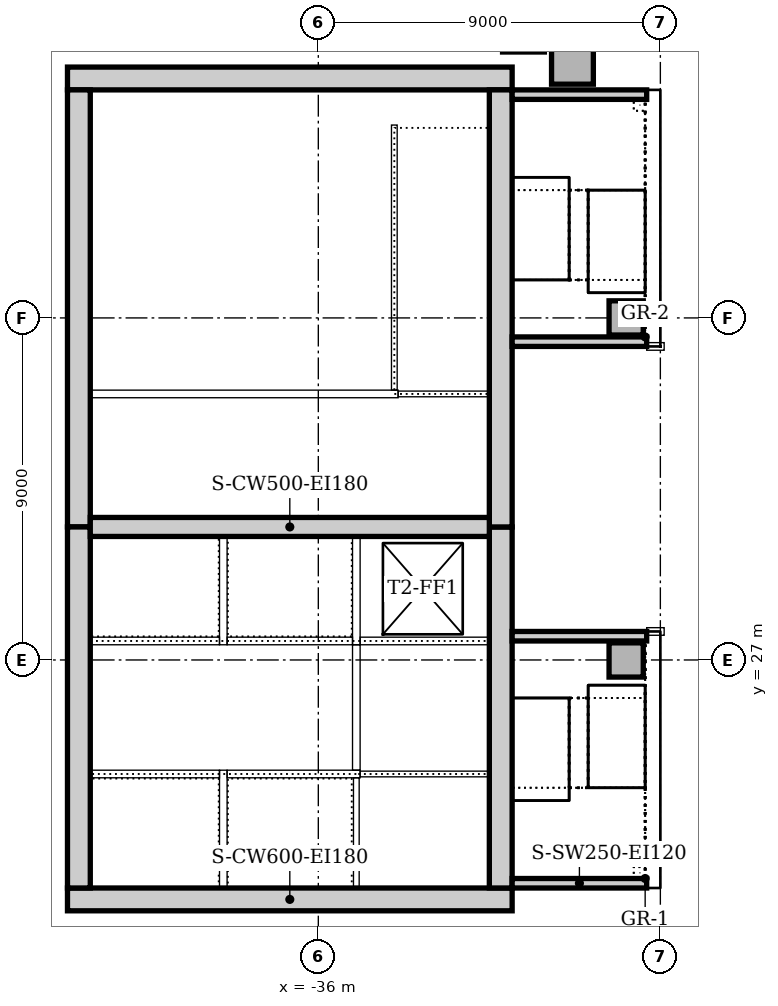
"""IFC4 building model, lengths in metres.
Left out: names, types, materials, properties, quantities, classifications, styles, units other than length and angle.
Written with IfcOpenShell. Run it as: python <this file> out.ifc"""

import sys

from ifc_helpers import new_model, si_unit, direction, frame, frame_2d, origin, origin_2d, place, context, subcontext, project, spatial, rectangle, extrude, element, fill, save


model = new_model("IFC4")
c1 = context("Model", 3, precision=1e-05, world=origin(), true_north=direction((0.0, 1.0)))
c2 = subcontext(c1, "Body", "Model", "MODEL_VIEW")
j1 = project(units=[si_unit("LENGTHUNIT", "METRE"), si_unit("PLANEANGLEUNIT", "RADIAN")], contexts=[c1])
p1 = place(None, origin())
s1 = spatial("IfcSite", under=j1, at=p1, CompositionType="ELEMENT")
p2 = place(p1, origin())
s2 = spatial("IfcBuilding", under=s1, at=p2, CompositionType="ELEMENT")
p3 = place(p2, frame((0.0, 0.0, -5.0)))
s3 = spatial("IfcBuildingStorey", under=s2, at=p3, CompositionType="ELEMENT", Elevation=-5.0)
for number, where, z_axis, x_axis in (
    (1, (-42.6, 20.7, 0.0), (0.0, 0.0, 1.0), (1.0, 0.0, 0.0)),
    (2, (-30.9, 42.3, 0.0), (0.0, 0.0, 1.0), (-1.0, 0.0, 0.0)),
):
    element("IfcWall", number, at=place(p3, frame(where, z_axis=z_axis, x_axis=x_axis)), inside=s3, PredefinedType="SOLIDWALL", context=c2, shape_type="SweptSolid", body=[
        extrude(rectangle(XDim=11.7, YDim=0.6, at=frame_2d((5.85, 0.0))), origin(), (0.0, 0.0, 1.0), 5.0),
    ])
p4 = place(p3, frame((-31.2, 21.0, 0.0), z_axis=(0.0, 0.0, 1.0), x_axis=(0.0, 1.0, 0.0)))
e3 = element("IfcWall", 3, at=p4, inside=s3, PredefinedType="SOLIDWALL", context=c2, shape_type="SweptSolid", body=[
    extrude(rectangle(XDim=9.5, YDim=0.6, at=frame_2d((4.75, 0.0))), origin(), (0.0, 0.0, 1.0), 5.0),
])
p5 = place(p4, frame((5.25, 0.0, 0.0)))
e4 = element("IfcOpeningElement", 4, at=p5, cuts=e3, PredefinedType="OPENING", context=c2, shape_type="SweptSolid", body=[
    extrude(rectangle(XDim=1.0, YDim=2.1, at=frame_2d((0.5, 1.05))), frame((0.0, 0.31, 0.0), z_axis=(0.0, -1.0, 0.0), x_axis=(1.0, 0.0, 0.0)), (0.0, 0.0, 1.0), 0.62),
])
p6 = place(p3, frame((-31.2, 30.5, 0.0), z_axis=(0.0, 0.0, 1.0), x_axis=(0.0, 1.0, 0.0)))
e5 = element("IfcWall", 5, at=p6, inside=s3, PredefinedType="SOLIDWALL", context=c2, shape_type="SweptSolid", body=[
    extrude(rectangle(XDim=11.5, YDim=0.6, at=frame_2d((5.75, 0.0))), origin(), (0.0, 0.0, 1.0), 5.0),
])
p7 = place(p6, frame((0.85, 0.0, 0.0)))
e6 = element("IfcOpeningElement", 6, at=p7, cuts=e5, PredefinedType="OPENING", context=c2, shape_type="SweptSolid", body=[
    extrude(rectangle(XDim=1.8, YDim=2.1, at=frame_2d((0.9, 1.05))), frame((0.0, 0.31, 0.0), z_axis=(0.0, -1.0, 0.0), x_axis=(1.0, 0.0, 0.0)), (0.0, 0.0, 1.0), 0.62),
])
p8 = place(p3, frame((-42.3, 42.0, 0.0), z_axis=(0.0, 0.0, 1.0), x_axis=(0.0, -1.0, 0.0)))
e7 = element("IfcWall", 7, at=p8, inside=s3, PredefinedType="SOLIDWALL", context=c2, shape_type="SweptSolid", body=[
    extrude(rectangle(XDim=11.5, YDim=0.6, at=frame_2d((5.75, 0.0))), origin(), (0.0, 0.0, 1.0), 5.0),
])
p9 = place(p8, frame((8.85, 0.0, 0.0)))
e8 = element("IfcOpeningElement", 8, at=p9, cuts=e7, PredefinedType="OPENING", context=c2, shape_type="SweptSolid", body=[
    extrude(rectangle(XDim=1.8, YDim=2.1, at=frame_2d((0.9, 1.05))), frame((0.0, 0.31, 0.0), z_axis=(0.0, -1.0, 0.0), x_axis=(1.0, 0.0, 0.0)), (0.0, 0.0, 1.0), 0.62),
])
p10 = place(p3, frame((-42.3, 30.5, 0.0), z_axis=(0.0, 0.0, 1.0), x_axis=(0.0, -1.0, 0.0)))
e9 = element("IfcWall", 9, at=p10, inside=s3, PredefinedType="SOLIDWALL", context=c2, shape_type="SweptSolid", body=[
    extrude(rectangle(XDim=9.5, YDim=0.6, at=frame_2d((4.75, 0.0))), origin(), (0.0, 0.0, 1.0), 5.0),
])
p11 = place(p3, frame((-42.0, 30.5, 0.0), z_axis=(0.0, 0.0, 1.0), x_axis=(1.0, 0.0, 0.0)))
e10 = element("IfcWall", 10, at=p11, inside=s3, PredefinedType="SOLIDWALL", context=c2, shape_type="SweptSolid", body=[
    extrude(rectangle(XDim=10.5, YDim=0.5, at=frame_2d((5.25, 0.0))), origin(), (0.0, 0.0, 1.0), 5.0),
])
p12 = place(p3, frame((-30.9, 21.125, 0.0), z_axis=(0.0, 0.0, 1.0), x_axis=(1.0, 0.0, 0.0)))
e11 = element("IfcWall", 11, at=p12, inside=s3, PredefinedType="SOLIDWALL", context=c2, shape_type="SweptSolid", body=[
    extrude(rectangle(XDim=3.54, YDim=0.25, at=frame_2d((1.77, 0.0))), origin(), (0.0, 0.0, 1.0), 5.0),
])
p13 = place(p3, frame((-27.36, 27.625, 0.0), z_axis=(0.0, 0.0, 1.0), x_axis=(-1.0, 0.0, 0.0)))
e12 = element("IfcWall", 12, at=p13, inside=s3, PredefinedType="SOLIDWALL", context=c2, shape_type="SweptSolid", body=[
    extrude(rectangle(XDim=3.54, YDim=0.25, at=frame_2d((1.77, 0.0))), origin(), (0.0, 0.0, 1.0), 5.0),
])
p14 = place(p13, frame((1.69, 0.0, 0.0)))
e13 = element("IfcOpeningElement", 13, at=p14, cuts=e12, PredefinedType="OPENING", context=c2, shape_type="SweptSolid", body=[
    extrude(rectangle(XDim=1.1, YDim=2.1, at=frame_2d((0.55, 1.05))), frame((0.0, 0.135, 0.0), z_axis=(0.0, -1.0, 0.0), x_axis=(1.0, 0.0, 0.0)), (0.0, 0.0, 1.0), 0.27),
])
p15 = place(p3, frame((-30.9, 35.375, 0.0), z_axis=(0.0, 0.0, 1.0), x_axis=(1.0, 0.0, 0.0)))
e14 = element("IfcWall", 14, at=p15, inside=s3, PredefinedType="SOLIDWALL", context=c2, shape_type="SweptSolid", body=[
    extrude(rectangle(XDim=3.54, YDim=0.25, at=frame_2d((1.77, 0.0))), origin(), (0.0, 0.0, 1.0), 5.0),
])
p16 = place(p15, frame((0.75, 0.0, 0.0)))
e15 = element("IfcOpeningElement", 15, at=p16, cuts=e14, PredefinedType="OPENING", context=c2, shape_type="SweptSolid", body=[
    extrude(rectangle(XDim=1.1, YDim=2.1, at=frame_2d((0.55, 1.05))), frame((0.0, 0.135, 0.0), z_axis=(0.0, -1.0, 0.0), x_axis=(1.0, 0.0, 0.0)), (0.0, 0.0, 1.0), 0.27),
])
p17 = place(p3, frame((-27.36, 41.875, 0.0), z_axis=(0.0, 0.0, 1.0), x_axis=(-1.0, 0.0, 0.0)))
e16 = element("IfcWall", 16, at=p17, inside=s3, PredefinedType="SOLIDWALL", context=c2, shape_type="SweptSolid", body=[
    extrude(rectangle(XDim=3.54, YDim=0.25, at=frame_2d((1.77, 0.0))), origin(), (0.0, 0.0, 1.0), 5.0),
])
for number, where, z_axis, x_axis in (
    (17, (-29.313, 42.7, 0.0), (0.0, 0.0, 1.0), (1.0, 0.0, 0.0)),
    (18, (-30.602, 43.547, 0.0), (0.0, 0.0, 1.0), (1.0, 0.0, 0.0)),
):
    element("IfcColumn", number, at=place(p3, frame(where, z_axis=z_axis, x_axis=x_axis)), inside=s3, PredefinedType="COLUMN", context=c2, shape_type="SweptSolid", body=[
        extrude(rectangle(XDim=1.1, YDim=1.1, at=origin_2d()), origin(), (0.0, 0.0, 1.0), 4.7),
    ])
for number, where, z_axis, x_axis in (
    (19, (-27.9, 27.0, 0.0), (0.0, 0.0, 1.0), (1.0, 0.0, 0.0)),
    (20, (-27.9, 36.0, 0.0), (0.0, 0.0, 1.0), (1.0, 0.0, 0.0)),
):
    element("IfcColumn", number, at=place(p3, frame(where, z_axis=z_axis, x_axis=x_axis)), inside=s3, PredefinedType="COLUMN", context=c2, shape_type="SweptSolid", body=[
        extrude(rectangle(XDim=0.9, YDim=0.9, at=origin_2d()), origin(), (0.0, 0.0, 1.0), 5.0),
    ])
p18 = place(p3, frame((-38.5, 21.0, 0.0), z_axis=(0.0, 0.0, 1.0), x_axis=(0.0, 1.0, 0.0)))
e21 = element("IfcWall", 21, at=p18, inside=s3, PredefinedType="SOLIDWALL", context=c2, shape_type="SweptSolid", body=[
    extrude(rectangle(XDim=3.1, YDim=0.2, at=frame_2d((1.55, 0.0))), origin(), (0.0, 0.0, 1.0), 5.0),
])
p19 = place(p3, frame((-38.6, 24.0, 0.0), z_axis=(0.0, 0.0, 1.0), x_axis=(-1.0, 0.0, 0.0)))
e22 = element("IfcWall", 22, at=p19, inside=s3, PredefinedType="SOLIDWALL", context=c2, shape_type="SweptSolid", body=[
    extrude(rectangle(XDim=3.4, YDim=0.2, at=frame_2d((1.7, 0.0))), origin(), (0.0, 0.0, 1.0), 5.0),
])
p20 = place(p3, frame((-34.9, 24.0, 0.0), z_axis=(0.0, 0.0, 1.0), x_axis=(-1.0, 0.0, 0.0)))
e23 = element("IfcWall", 23, at=p20, inside=s3, PredefinedType="SOLIDWALL", context=c2, shape_type="SweptSolid", body=[
    extrude(rectangle(XDim=3.5, YDim=0.2, at=frame_2d((1.75, 0.0))), origin(), (0.0, 0.0, 1.0), 5.0),
])
p21 = place(p3, frame((-38.5, 27.4, 0.0), z_axis=(0.0, 0.0, 1.0), x_axis=(0.0, 1.0, 0.0)))
e24 = element("IfcWall", 24, at=p21, inside=s3, PredefinedType="SOLIDWALL", context=c2, shape_type="SweptSolid", body=[
    extrude(rectangle(XDim=2.85, YDim=0.2, at=frame_2d((1.425, 0.0))), origin(), (0.0, 0.0, 1.0), 5.0),
])
p22 = place(p3, frame((-42.0, 27.5, 0.0), z_axis=(0.0, 0.0, 1.0), x_axis=(1.0, 0.0, 0.0)))
e25 = element("IfcWall", 25, at=p22, inside=s3, PredefinedType="SOLIDWALL", context=c2, shape_type="SweptSolid", body=[
    extrude(rectangle(XDim=3.4, YDim=0.2, at=frame_2d((1.7, 0.0))), origin(), (0.0, 0.0, 1.0), 5.0),
])
p23 = place(p3, frame((-35.0, 27.4, 0.0), z_axis=(0.0, 0.0, 1.0), x_axis=(0.0, 1.0, 0.0)))
e26 = element("IfcWall", 26, at=p23, inside=s3, PredefinedType="SOLIDWALL", context=c2, shape_type="SweptSolid", body=[
    extrude(rectangle(XDim=2.85, YDim=0.2, at=frame_2d((1.425, 0.0))), origin(), (0.0, 0.0, 1.0), 5.0),
])
p24 = place(p3, frame((-38.4, 27.5, 0.0), z_axis=(0.0, 0.0, 1.0), x_axis=(1.0, 0.0, 0.0)))
e27 = element("IfcWall", 27, at=p24, inside=s3, PredefinedType="SOLIDWALL", context=c2, shape_type="SweptSolid", body=[
    extrude(rectangle(XDim=3.3, YDim=0.2, at=frame_2d((1.65, 0.0))), origin(), (0.0, 0.0, 1.0), 5.0),
])
p25 = place(p3, frame((-34.9, 27.5, 0.0), z_axis=(0.0, 0.0, 1.0), x_axis=(1.0, 0.0, 0.0)))
e28 = element("IfcWall", 28, at=p25, inside=s3, PredefinedType="SOLIDWALL", context=c2, shape_type="SweptSolid", body=[
    extrude(rectangle(XDim=3.4, YDim=0.2, at=frame_2d((1.7, 0.0))), origin(), (0.0, 0.0, 1.0), 5.0),
])
p26 = place(p25, frame((1.1, 0.0, 0.0)))
e29 = element("IfcOpeningElement", 29, at=p26, cuts=e28, PredefinedType="OPENING", context=c2, shape_type="SweptSolid", body=[
    extrude(rectangle(XDim=1.1, YDim=2.1, at=frame_2d((0.55, 1.05))), frame((0.0, 0.11, 0.0), z_axis=(0.0, -1.0, 0.0), x_axis=(1.0, 0.0, 0.0)), (0.0, 0.0, 1.0), 0.22),
])
p27 = place(p3, frame((-35.0, 24.1, 0.0), z_axis=(0.0, 0.0, 1.0), x_axis=(0.0, 1.0, 0.0)))
e30 = element("IfcWall", 30, at=p27, inside=s3, PredefinedType="SOLIDWALL", context=c2, shape_type="SweptSolid", body=[
    extrude(rectangle(XDim=3.3, YDim=0.2, at=frame_2d((1.65, 0.0))), origin(), (0.0, 0.0, 1.0), 5.0),
])
for number, where, z_axis, x_axis in (
    (31, (-27.36, 27.75, 0.0), (0.0, 0.0, 1.0), (1.0, 0.0, 0.0)),
    (32, (-26.9, 35.25, 0.0), (0.0, 0.0, 1.0), (-1.0, 0.0, 0.0)),
):
    element("IfcWall", number, at=place(p3, frame(where, z_axis=z_axis, x_axis=x_axis)), inside=s3, PredefinedType="SOLIDWALL", context=c2, shape_type="SweptSolid", body=[
        extrude(rectangle(XDim=0.46, YDim=0.2, at=frame_2d((0.23, 0.0))), origin(), (0.0, 0.0, 1.0), 5.0),
    ])
p28 = place(p3, frame((-33.9, 34.0, 0.0), z_axis=(0.0, 0.0, 1.0), x_axis=(-1.0, 0.0, 0.0)))
e33 = element("IfcWall", 33, at=p28, inside=s3, PredefinedType="SOLIDWALL", context=c2, shape_type="SweptSolid", body=[
    extrude(rectangle(XDim=8.1, YDim=0.2, at=frame_2d((4.05, 0.0))), origin(), (0.0, 0.0, 1.0), 5.0),
])
p29 = place(p3, frame((-35.0, 21.0, 0.0), z_axis=(0.0, 0.0, 1.0), x_axis=(0.0, 1.0, 0.0)))
e34 = element("IfcWall", 34, at=p29, inside=s3, PredefinedType="SOLIDWALL", context=c2, shape_type="SweptSolid", body=[
    extrude(rectangle(XDim=2.9, YDim=0.15, at=frame_2d((1.45, 0.0))), origin(), (0.0, 0.0, 1.0), 5.0),
])
p30 = place(p3, frame((-31.5, 24.0, 0.0), z_axis=(0.0, 0.0, 1.0), x_axis=(-1.0, 0.0, 0.0)))
e35 = element("IfcWall", 35, at=p30, inside=s3, PredefinedType="SOLIDWALL", context=c2, shape_type="SweptSolid", body=[
    extrude(rectangle(XDim=3.4, YDim=0.15, at=frame_2d((1.7, 0.0))), origin(), (0.0, 0.0, 1.0), 5.0),
])
p31 = place(p3, frame((-33.9, 34.0, 0.0), z_axis=(0.0, 0.0, 1.0), x_axis=(1.0, 0.0, 0.0)))
e36 = element("IfcWall", 36, at=p31, inside=s3, PredefinedType="SOLIDWALL", context=c2, shape_type="SweptSolid", body=[
    extrude(rectangle(XDim=2.4, YDim=0.15, at=frame_2d((1.2, 0.0))), origin(), (0.0, 0.0, 1.0), 5.0),
])
p32 = place(p3, frame((-34.0, 41.075, 0.0), z_axis=(0.0, 0.0, 1.0), x_axis=(0.0, -1.0, 0.0)))
e37 = element("IfcWall", 37, at=p32, inside=s3, PredefinedType="SOLIDWALL", context=c2, shape_type="SweptSolid", body=[
    extrude(rectangle(XDim=6.975, YDim=0.15, at=frame_2d((3.487, 0.0))), origin(), (0.0, 0.0, 1.0), 5.0),
])
p33 = place(p26, origin())
e38 = element("IfcDoor", 38, at=p33, inside=s3, OperationType="SLIDING_TO_LEFT", PredefinedType="DOOR", context=c2, shape_type="SweptSolid", body=[
    extrude(rectangle(XDim=1.1, YDim=2.1, at=frame_2d((0.55, 1.05))), frame((0.0, 0.025, 0.0), z_axis=(0.0, -1.0, 0.0), x_axis=(1.0, 0.0, 0.0)), (0.0, 0.0, 1.0), 0.05),
])
fill(e29, e38)
p34 = place(p5, frame((1.0, 0.0, 0.0), z_axis=(0.0, 0.0, 1.0), x_axis=(-1.0, 0.0, 0.0)))
e39 = element("IfcDoor", 39, at=p34, inside=s3, OperationType="SINGLE_SWING_LEFT", PredefinedType="DOOR", context=c2, shape_type="SweptSolid", body=[
    extrude(rectangle(XDim=1.0, YDim=2.1, at=frame_2d((0.5, 1.05))), frame((0.0, 0.025, 0.0), z_axis=(0.0, -1.0, 0.0), x_axis=(1.0, 0.0, 0.0)), (0.0, 0.0, 1.0), 0.05),
])
fill(e4, e39)
p35 = place(p14, origin())
e40 = element("IfcDoor", 40, at=p35, inside=s3, OperationType="SINGLE_SWING_RIGHT", PredefinedType="DOOR", context=c2, shape_type="SweptSolid", body=[
    extrude(rectangle(XDim=1.1, YDim=2.1, at=frame_2d((0.55, 1.05))), frame((0.0, 0.025, 0.0), z_axis=(0.0, -1.0, 0.0), x_axis=(1.0, 0.0, 0.0)), (0.0, 0.0, 1.0), 0.05),
])
fill(e13, e40)
p36 = place(p16, origin())
e41 = element("IfcDoor", 41, at=p36, inside=s3, OperationType="SINGLE_SWING_LEFT", PredefinedType="DOOR", context=c2, shape_type="SweptSolid", body=[
    extrude(rectangle(XDim=1.1, YDim=2.1, at=frame_2d((0.55, 1.05))), frame((0.0, 0.025, 0.0), z_axis=(0.0, -1.0, 0.0), x_axis=(1.0, 0.0, 0.0)), (0.0, 0.0, 1.0), 0.05),
])
fill(e15, e41)
p37 = place(p7, origin())
e42 = element("IfcDoor", 42, at=p37, inside=s3, OperationType="DOUBLE_DOOR_SINGLE_SWING", PredefinedType="DOOR", context=c2, shape_type="SweptSolid", body=[
    extrude(rectangle(XDim=1.8, YDim=2.1, at=frame_2d((0.9, 1.05))), frame((0.0, 0.025, 0.0), z_axis=(0.0, -1.0, 0.0), x_axis=(1.0, 0.0, 0.0)), (0.0, 0.0, 1.0), 0.05),
])
fill(e6, e42)
p38 = place(p9, frame((1.8, 0.0, 0.0), z_axis=(0.0, 0.0, 1.0), x_axis=(-1.0, 0.0, 0.0)))
e43 = element("IfcDoor", 43, at=p38, inside=s3, OperationType="DOUBLE_DOOR_SINGLE_SWING", PredefinedType="DOOR", context=c2, shape_type="SweptSolid", body=[
    extrude(rectangle(XDim=1.8, YDim=2.1, at=frame_2d((0.9, 1.05))), frame((0.0, 0.025, 0.0), z_axis=(0.0, -1.0, 0.0), x_axis=(1.0, 0.0, 0.0)), (0.0, 0.0, 1.0), 0.05),
])
fill(e8, e43)
save(model, sys.argv[1])
